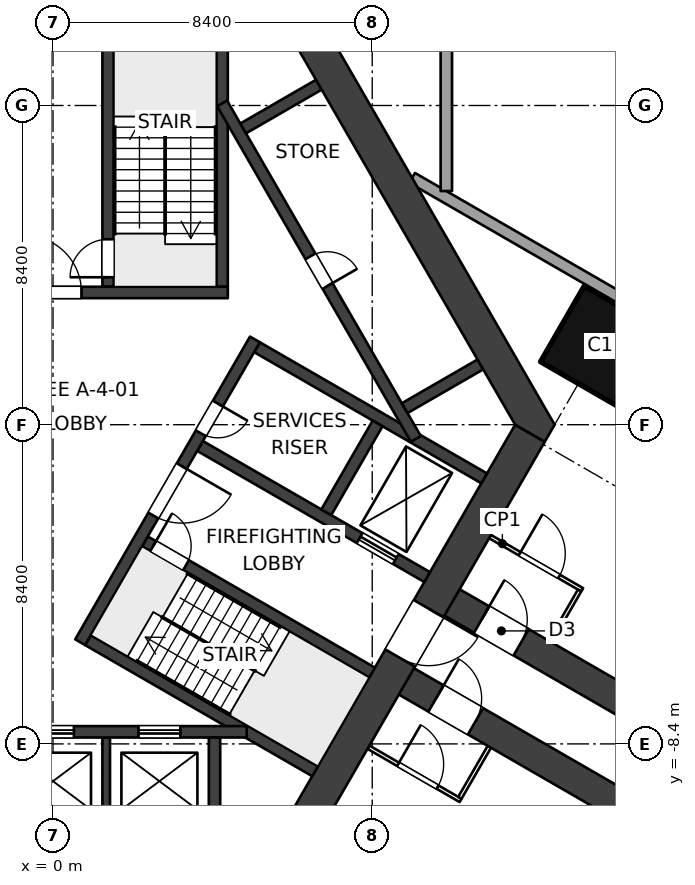
"""IFC4 building model, lengths in metres.
Left out: names, types, materials, properties, quantities, classifications, styles, units other than length and angle.
Written with IfcOpenShell. Run it as: python <this file> out.ifc"""

import sys

from ifc_helpers import new_model, si_unit, direction, frame, frame_2d, origin, origin_2d, place, context, subcontext, project, spatial, polyline, rectangle, outline, extrude, element, fill, save


model = new_model("IFC4")
c1 = context("Model", 3, precision=1e-05, world=origin(), true_north=direction((0.0, 1.0)))
c2 = subcontext(c1, "Body", "Model", "MODEL_VIEW")
j1 = project(units=[si_unit("LENGTHUNIT", "METRE"), si_unit("PLANEANGLEUNIT", "RADIAN")], contexts=[c1])
p1 = place(None, origin())
s1 = spatial("IfcSite", under=j1, at=p1, CompositionType="ELEMENT")
p2 = place(p1, origin())
s2 = spatial("IfcBuilding", under=s1, at=p2, CompositionType="ELEMENT")
p3 = place(p2, frame((0.0, 0.0, -7.0)))
s3 = spatial("IfcBuildingStorey", under=s2, at=p3, CompositionType="ELEMENT", Elevation=-7.0)
p4 = place(p3, frame((14.4, 2.078, 0.0), z_axis=(0.0, 0.0, 1.0), x_axis=(-0.5, -0.866025403784, 0.0)))
e1 = element("IfcColumn", 1, at=p4, inside=s3, PredefinedType="COLUMN", context=c2, shape_type="SweptSolid", body=[
    extrude(rectangle(XDim=2.3, YDim=2.3, at=origin_2d()), origin(), (0.0, 0.0, 1.0), 3.5),
])
p5 = place(p3, frame((12.551, -0.225, 0.0), z_axis=(0.0, 0.0, 1.0), x_axis=(-0.499997612506, -0.8660267822, 0.0)))
e2 = element("IfcWall", 2, at=p5, inside=s3, PredefinedType="SHEAR", context=c2, shape_type="SweptSolid", body=[
    extrude(rectangle(XDim=12.161, YDim=0.9, at=frame_2d((6.08, 0.0))), origin(), (0.0, 0.0, 1.0), 3.5),
])
p6 = place(p5, frame((5.33, 0.0, 0.0)))
e3 = element("IfcOpeningElement", 3, at=p6, cuts=e2, PredefinedType="OPENING", context=c2, shape_type="SweptSolid", body=[
    extrude(rectangle(XDim=1.5, YDim=2.1, at=frame_2d((0.75, 1.05))), frame((0.0, 0.46, 0.0), z_axis=(0.0, -1.0, 0.0), x_axis=(1.0, 0.0, 0.0)), (0.0, 0.0, 1.0), 0.92),
])
p7 = place(p3, origin())
e4 = element("IfcWall", 4, at=p7, inside=s3, PredefinedType="SHEAR", context=c2, shape_type="SweptSolid", body=[
    extrude(outline(polyline([(13.2, 0.0), (6.6, 11.432), (6.08, 11.432), (6.08, 10.531), (12.161, 0.0), (12.94, -0.45), (13.2, 0.0)])), origin(), (0.0, 0.0, 1.0), 3.5),
])
p8 = place(p3, frame((-4.6, 3.48, 0.0), z_axis=(0.0, 0.0, 1.0), x_axis=(1.0, 0.0, 0.0)))
e5 = element("IfcWall", 5, at=p8, inside=s3, PredefinedType="SHEAR", context=c2, shape_type="SweptSolid", body=[
    extrude(rectangle(XDim=9.2, YDim=0.3, at=frame_2d((4.6, 0.0))), origin(), (0.0, 0.0, 1.0), 3.5),
])
p9 = place(p8, frame((3.85, 0.0, 0.0)))
e6 = element("IfcOpeningElement", 6, at=p9, cuts=e5, PredefinedType="OPENING", context=c2, shape_type="SweptSolid", body=[
    extrude(rectangle(XDim=1.5, YDim=2.1, at=frame_2d((0.75, 1.05))), frame((0.0, 0.16, 0.0), z_axis=(0.0, -1.0, 0.0), x_axis=(1.0, 0.0, 0.0)), (0.0, 0.0, 1.0), 0.32),
])
p10 = place(p8, frame((1.95, 0.0, 0.0)))
e7 = element("IfcOpeningElement", 7, at=p10, cuts=e5, PredefinedType="OPENING", context=c2, shape_type="SweptSolid", body=[
    extrude(rectangle(XDim=0.9, YDim=2.1, at=frame_2d((0.45, 1.05))), frame((0.0, 0.16, 0.0), z_axis=(0.0, -1.0, 0.0), x_axis=(1.0, 0.0, 0.0)), (0.0, 0.0, 1.0), 0.32),
])
p11 = place(p3, frame((1.45, 3.63, 0.0), z_axis=(0.0, 0.0, 1.0), x_axis=(0.0, 1.0, 0.0)))
e8 = element("IfcWall", 8, at=p11, inside=s3, PredefinedType="SHEAR", context=c2, shape_type="SweptSolid", body=[
    extrude(rectangle(XDim=6.902, YDim=0.3, at=frame_2d((3.451, 0.0))), origin(), (0.0, 0.0, 1.0), 3.5),
])
p12 = place(p11, frame((0.25, 0.0, 0.0)))
e9 = element("IfcOpeningElement", 9, at=p12, cuts=e8, PredefinedType="OPENING", context=c2, shape_type="SweptSolid", body=[
    extrude(rectangle(XDim=1.0, YDim=2.1, at=frame_2d((0.5, 1.05))), frame((0.0, 0.16, 0.0), z_axis=(0.0, -1.0, 0.0), x_axis=(1.0, 0.0, 0.0)), (0.0, 0.0, 1.0), 0.32),
])
p13 = place(p3, frame((4.45, 3.63, 0.0), z_axis=(0.0, 0.0, 1.0), x_axis=(0.0, 1.0, 0.0)))
e10 = element("IfcWall", 10, at=p13, inside=s3, PredefinedType="SHEAR", context=c2, shape_type="SweptSolid", body=[
    extrude(rectangle(XDim=6.902, YDim=0.3, at=frame_2d((3.451, 0.0))), origin(), (0.0, 0.0, 1.0), 3.5),
])
p14 = place(p3, frame((5.314, 2.244, 0.0), z_axis=(0.0, 0.0, 1.0), x_axis=(-0.499995050369, -0.866028261437, 0.0)))
e11 = element("IfcWall", 11, at=p14, inside=s3, PredefinedType="SHEAR", context=c2, shape_type="SweptSolid", body=[
    extrude(rectangle(XDim=9.2, YDim=0.3, at=frame_2d((4.6, 0.0))), origin(), (0.0, 0.0, 1.0), 3.5),
])
p15 = place(p14, frame((3.85, 0.0, 0.0)))
e12 = element("IfcOpeningElement", 12, at=p15, cuts=e11, PredefinedType="OPENING", context=c2, shape_type="SweptSolid", body=[
    extrude(rectangle(XDim=1.5, YDim=2.1, at=frame_2d((0.75, 1.05))), frame((0.0, 0.16, 0.0), z_axis=(0.0, -1.0, 0.0), x_axis=(1.0, 0.0, 0.0)), (0.0, 0.0, 1.0), 0.32),
])
p16 = place(p14, frame((1.95, 0.0, 0.0)))
e13 = element("IfcOpeningElement", 13, at=p16, cuts=e11, PredefinedType="OPENING", context=c2, shape_type="SweptSolid", body=[
    extrude(rectangle(XDim=0.9, YDim=2.1, at=frame_2d((0.45, 1.05))), frame((0.0, 0.16, 0.0), z_axis=(0.0, -1.0, 0.0), x_axis=(1.0, 0.0, 0.0)), (0.0, 0.0, 1.0), 0.32),
])
p17 = place(p3, frame((2.419, -3.071, 0.0), z_axis=(0.0, 0.0, 1.0), x_axis=(0.86602711848, -0.499997030048, 0.0)))
e14 = element("IfcWall", 14, at=p17, inside=s3, PredefinedType="SHEAR", context=c2, shape_type="SweptSolid", body=[
    extrude(rectangle(XDim=6.901, YDim=0.3, at=frame_2d((3.451, 0.0))), origin(), (0.0, 0.0, 1.0), 3.5),
])
p18 = place(p17, frame((0.25, 0.0, 0.0)))
e15 = element("IfcOpeningElement", 15, at=p18, cuts=e14, PredefinedType="OPENING", context=c2, shape_type="SweptSolid", body=[
    extrude(rectangle(XDim=1.0, YDim=2.1, at=frame_2d((0.5, 1.05))), frame((0.0, 0.16, 0.0), z_axis=(0.0, -1.0, 0.0), x_axis=(1.0, 0.0, 0.0)), (0.0, 0.0, 1.0), 0.32),
])
p19 = place(p3, frame((0.919, -5.669, 0.0), z_axis=(0.0, 0.0, 1.0), x_axis=(0.866011800373, -0.500023561059, 0.0)))
e16 = element("IfcWall", 16, at=p19, inside=s3, PredefinedType="SHEAR", context=c2, shape_type="SweptSolid", body=[
    extrude(rectangle(XDim=6.902, YDim=0.3, at=frame_2d((3.451, 0.0))), origin(), (0.0, 0.0, 1.0), 3.5),
])
p20 = place(p3, frame((3.869, -0.559, 0.0), z_axis=(0.0, 0.0, 1.0), x_axis=(0.86602711848, -0.499997030048, 0.0)))
e17 = element("IfcWall", 17, at=p20, inside=s3, PredefinedType="SHEAR", context=c2, shape_type="SweptSolid", body=[
    extrude(rectangle(XDim=6.901, YDim=0.3, at=frame_2d((3.451, 0.0))), origin(), (0.0, 0.0, 1.0), 3.5),
])
p21 = place(p20, frame((4.85, 0.0, 0.0)))
e18 = element("IfcOpeningElement", 18, at=p21, cuts=e17, PredefinedType="OPENING", context=c2, shape_type="SweptSolid", body=[
    extrude(rectangle(XDim=1.1, YDim=2.1, at=frame_2d((0.55, 1.05))), frame((0.0, 0.16, 0.0), z_axis=(0.0, -1.0, 0.0), x_axis=(1.0, 0.0, 0.0)), (0.0, 0.0, 1.0), 0.32),
])
p22 = place(p3, frame((5.369, 2.039, 0.0), z_axis=(0.0, 0.0, 1.0), x_axis=(0.86602711848, -0.499997030048, 0.0)))
e19 = element("IfcWall", 19, at=p22, inside=s3, PredefinedType="SHEAR", context=c2, shape_type="SweptSolid", body=[
    extrude(rectangle(XDim=6.901, YDim=0.3, at=frame_2d((3.451, 0.0))), origin(), (0.0, 0.0, 1.0), 3.5),
])
p23 = place(p3, frame((8.541, 0.034, 0.0), z_axis=(0.0, 0.0, 1.0), x_axis=(-0.50000943426, -0.866019956843, 0.0)))
e20 = element("IfcWall", 20, at=p23, inside=s3, PredefinedType="SHEAR", context=c2, shape_type="SweptSolid", body=[
    extrude(rectangle(XDim=2.7, YDim=0.3, at=frame_2d((1.35, 0.0))), origin(), (0.0, 0.0, 1.0), 3.5),
])
p24 = place(p3, frame((5.098, -8.082, 0.0), z_axis=(0.0, 0.0, 1.0), x_axis=(-1.0, 0.0, 0.0)))
e21 = element("IfcWall", 21, at=p24, inside=s3, PredefinedType="SHEAR", context=c2, shape_type="SweptSolid", body=[
    extrude(rectangle(XDim=10.195, YDim=0.3, at=frame_2d((5.098, 0.0))), origin(), (0.0, 0.0, 1.0), 3.5),
])
p25 = place(p24, frame((1.748, 0.0, 0.0)))
e22 = element("IfcOpeningElement", 22, at=p25, cuts=e21, PredefinedType="OPENING", context=c2, shape_type="SweptSolid", body=[
    extrude(rectangle(XDim=1.1, YDim=2.1, at=frame_2d((0.55, 1.05))), frame((0.0, 0.16, 0.0), z_axis=(0.0, -1.0, 0.0), x_axis=(1.0, 0.0, 0.0)), (0.0, 0.0, 1.0), 0.32),
])
p26 = place(p24, frame((4.548, 0.0, 0.0)))
e23 = element("IfcOpeningElement", 23, at=p26, cuts=e21, PredefinedType="OPENING", context=c2, shape_type="SweptSolid", body=[
    extrude(rectangle(XDim=1.1, YDim=2.1, at=frame_2d((0.55, 1.05))), frame((0.0, 0.16, 0.0), z_axis=(0.0, -1.0, 0.0), x_axis=(1.0, 0.0, 0.0)), (0.0, 0.0, 1.0), 0.32),
])
p27 = place(p24, frame((7.348, 0.0, 0.0)))
e24 = element("IfcOpeningElement", 24, at=p27, cuts=e21, PredefinedType="OPENING", context=c2, shape_type="SweptSolid", body=[
    extrude(rectangle(XDim=1.1, YDim=2.1, at=frame_2d((0.55, 1.05))), frame((0.0, 0.16, 0.0), z_axis=(0.0, -1.0, 0.0), x_axis=(1.0, 0.0, 0.0)), (0.0, 0.0, 1.0), 0.32),
])
p28 = place(p3, frame((4.25, -8.231, 0.0), z_axis=(0.0, 0.0, 1.0), x_axis=(0.0, -1.0, 0.0)))
e25 = element("IfcWall", 25, at=p28, inside=s3, PredefinedType="SHEAR", context=c2, shape_type="SweptSolid", body=[
    extrude(rectangle(XDim=2.3, YDim=0.3, at=frame_2d((1.15, 0.0))), origin(), (0.0, 0.0, 1.0), 3.5),
])
p29 = place(p3, frame((1.4, -8.231, 0.0), z_axis=(0.0, 0.0, 1.0), x_axis=(0.0, -1.0, 0.0)))
e26 = element("IfcWall", 26, at=p29, inside=s3, PredefinedType="SHEAR", context=c2, shape_type="SweptSolid", body=[
    extrude(rectangle(XDim=2.3, YDim=0.2, at=frame_2d((1.15, 0.0))), origin(), (0.0, 0.0, 1.0), 3.5),
])
p30 = place(p3, frame((4.45, 8.455, 0.0), z_axis=(0.0, 0.0, 1.0), x_axis=(0.500002290144, -0.866024081565, 0.0)))
e27 = element("IfcWall", 27, at=p30, inside=s3, PredefinedType="SHEAR", context=c2, shape_type="SweptSolid", body=[
    extrude(rectangle(XDim=10.195, YDim=0.3, at=frame_2d((5.098, 0.0))), origin(), (0.0, 0.0, 1.0), 3.5),
])
p31 = place(p30, frame((4.648, 0.0, 0.0)))
e28 = element("IfcOpeningElement", 28, at=p31, cuts=e27, PredefinedType="OPENING", context=c2, shape_type="SweptSolid", body=[
    extrude(rectangle(XDim=0.9, YDim=2.1, at=frame_2d((0.45, 1.05))), frame((0.0, 0.16, 0.0), z_axis=(0.0, -1.0, 0.0), x_axis=(1.0, 0.0, 0.0)), (0.0, 0.0, 1.0), 0.32),
])
for number, where, z_axis, x_axis in (
    (29, (5.004, 7.796, 0.0), (0.0, 0.0, 1.0), (0.866, 0.5, 0.0)),
    (30, (9.254, 0.435, 0.0), (0.0, 0.0, 1.0), (0.866, 0.5, 0.0)),
):
    element("IfcWall", number, at=place(p3, frame(where, z_axis=z_axis, x_axis=x_axis)), inside=s3, PredefinedType="SHEAR", context=c2, shape_type="SweptSolid", body=[
        extrude(rectangle(XDim=2.3, YDim=0.3, at=frame_2d((1.15, 0.0))), origin(), (0.0, 0.0, 1.0), 3.5),
    ])
p32 = place(p3, frame((10.11, -4.451, 0.0), z_axis=(0.0, 0.0, 1.0), x_axis=(0.866025284237, -0.500000207062, 0.0)))
e31 = element("IfcWall", 31, at=p32, inside=s3, PredefinedType="SHEAR", context=c2, shape_type="SweptSolid", body=[
    extrude(rectangle(XDim=36.75, YDim=0.8, at=frame_2d((18.375, 0.0))), origin(), (0.0, 0.0, 1.0), 3.5),
])
p33 = place(p32, frame((1.35, 0.0, 0.0)))
e32 = element("IfcOpeningElement", 32, at=p33, cuts=e31, PredefinedType="OPENING", context=c2, shape_type="SweptSolid", body=[
    extrude(rectangle(XDim=1.2, YDim=2.1, at=frame_2d((0.6, 1.05))), frame((0.0, 0.41, 0.0), z_axis=(0.0, -1.0, 0.0), x_axis=(1.0, 0.0, 0.0)), (0.0, 0.0, 1.0), 0.82),
])
p34 = place(p3, frame((8.91, -6.53, 0.0), z_axis=(0.0, 0.0, 1.0), x_axis=(0.866025284237, -0.500000207062, 0.0)))
e33 = element("IfcWall", 33, at=p34, inside=s3, PredefinedType="SHEAR", context=c2, shape_type="SweptSolid", body=[
    extrude(rectangle(XDim=36.75, YDim=0.8, at=frame_2d((18.375, 0.0))), origin(), (0.0, 0.0, 1.0), 3.5),
])
p35 = place(p34, frame((1.35, 0.0, 0.0)))
e34 = element("IfcOpeningElement", 34, at=p35, cuts=e33, PredefinedType="OPENING", context=c2, shape_type="SweptSolid", body=[
    extrude(rectangle(XDim=1.2, YDim=2.1, at=frame_2d((0.6, 1.05))), frame((0.0, 0.41, 0.0), z_axis=(0.0, -1.0, 0.0), x_axis=(1.0, 0.0, 0.0)), (0.0, 0.0, 1.0), 0.82),
])
p36 = place(p3, frame((11.5, -2.945, 0.0), z_axis=(0.0, 0.0, 1.0), x_axis=(0.866034573852, -0.49998411664, 0.0)))
e35 = element("IfcWall", 35, at=p36, inside=s3, PredefinedType="PARTITIONING", context=c2, shape_type="SweptSolid", body=[
    extrude(rectangle(XDim=2.8, YDim=0.1, at=frame_2d((1.4, 0.0))), origin(), (0.0, 0.0, 1.0), 3.2),
])
p37 = place(p36, frame((0.9, 0.0, 0.0)))
e36 = element("IfcOpeningElement", 36, at=p37, cuts=e35, PredefinedType="OPENING", context=c2, shape_type="SweptSolid", body=[
    extrude(rectangle(XDim=1.2, YDim=2.1, at=frame_2d((0.6, 1.05))), frame((0.0, 0.06, 0.0), z_axis=(0.0, -1.0, 0.0), x_axis=(1.0, 0.0, 0.0)), (0.0, 0.0, 1.0), 0.12),
])
p38 = place(p3, frame((13.082, -5.705, 0.0), z_axis=(0.0, 0.0, 1.0), x_axis=(0.500086022567, 0.865975732936, 0.0)))
e37 = element("IfcWall", 37, at=p38, inside=s3, PredefinedType="PARTITIONING", context=c2, shape_type="SweptSolid", body=[
    extrude(rectangle(XDim=1.55, YDim=0.1, at=frame_2d((0.775, 0.0))), origin(), (0.0, 0.0, 1.0), 3.2),
])
p39 = place(p3, frame((8.3, -8.487, 0.0), z_axis=(0.0, 0.0, 1.0), x_axis=(0.866034573852, -0.49998411664, 0.0)))
e38 = element("IfcWall", 38, at=p39, inside=s3, PredefinedType="PARTITIONING", context=c2, shape_type="SweptSolid", body=[
    extrude(rectangle(XDim=2.8, YDim=0.1, at=frame_2d((1.4, 0.0))), origin(), (0.0, 0.0, 1.0), 3.2),
])
p40 = place(p39, frame((0.9, 0.0, 0.0)))
e39 = element("IfcOpeningElement", 39, at=p40, cuts=e38, PredefinedType="OPENING", context=c2, shape_type="SweptSolid", body=[
    extrude(rectangle(XDim=1.2, YDim=2.1, at=frame_2d((0.6, 1.05))), frame((0.0, 0.06, 0.0), z_axis=(0.0, -1.0, 0.0), x_axis=(1.0, 0.0, 0.0)), (0.0, 0.0, 1.0), 0.12),
])
p41 = place(p3, frame((11.482, -8.476, 0.0), z_axis=(0.0, 0.0, 1.0), x_axis=(-0.500017819788, -0.86601511528, 0.0)))
e40 = element("IfcWall", 40, at=p41, inside=s3, PredefinedType="PARTITIONING", context=c2, shape_type="SweptSolid", body=[
    extrude(rectangle(XDim=1.55, YDim=0.1, at=frame_2d((0.775, 0.0))), origin(), (0.0, 0.0, 1.0), 3.2),
])
p42 = place(p3, frame((10.35, 6.149, 0.0), z_axis=(0.0, 0.0, 1.0), x_axis=(0.0, 1.0, 0.0)))
e41 = element("IfcWall", 41, at=p42, inside=s3, PredefinedType="SOLIDWALL", context=c2, shape_type="SweptSolid", body=[
    extrude(rectangle(XDim=41.883, YDim=0.3, at=frame_2d((20.941, 0.0))), origin(), (0.0, 0.0, 1.0), 3.2),
])
p43 = place(p42, frame((25.383, 0.0, 0.0)))
e42 = element("IfcOpeningElement", 42, at=p43, cuts=e41, PredefinedType="OPENING", context=c2, shape_type="SweptSolid", body=[
    extrude(rectangle(XDim=1.8, YDim=2.4, at=frame_2d((0.9, 1.2))), frame((0.0, 0.16, 0.0), z_axis=(0.0, -1.0, 0.0), x_axis=(1.0, 0.0, 0.0)), (0.0, 0.0, 1.0), 0.32),
])
p44 = place(p3, frame((9.45, 6.495, 0.0), z_axis=(0.0, 0.0, 1.0), x_axis=(0.866025301493, -0.500000177174, 0.0)))
e43 = element("IfcWall", 43, at=p44, inside=s3, PredefinedType="SOLIDWALL", context=c2, shape_type="SweptSolid", body=[
    extrude(rectangle(XDim=43.095, YDim=0.3, at=frame_2d((21.548, 0.0))), origin(), (0.0, 0.0, 1.0), 3.2),
])
p45 = place(p44, frame((26.595, 0.0, 0.0)))
e44 = element("IfcOpeningElement", 44, at=p45, cuts=e43, PredefinedType="OPENING", context=c2, shape_type="SweptSolid", body=[
    extrude(rectangle(XDim=1.8, YDim=2.4, at=frame_2d((0.9, 1.2))), frame((0.0, 0.16, 0.0), z_axis=(0.0, -1.0, 0.0), x_axis=(1.0, 0.0, 0.0)), (0.0, 0.0, 1.0), 0.32),
])
p46 = place(p25, origin())
e45 = element("IfcDoor", 45, at=p46, inside=s3, OperationType="DOUBLE_DOOR_SLIDING", PredefinedType="DOOR", context=c2, shape_type="SweptSolid", body=[
    extrude(rectangle(XDim=1.1, YDim=2.1, at=frame_2d((0.55, 1.05))), frame((0.0, 0.025, 0.0), z_axis=(0.0, -1.0, 0.0), x_axis=(1.0, 0.0, 0.0)), (0.0, 0.0, 1.0), 0.05),
])
fill(e22, e45)
p47 = place(p26, origin())
e46 = element("IfcDoor", 46, at=p47, inside=s3, OperationType="DOUBLE_DOOR_SLIDING", PredefinedType="DOOR", context=c2, shape_type="SweptSolid", body=[
    extrude(rectangle(XDim=1.1, YDim=2.1, at=frame_2d((0.55, 1.05))), frame((0.0, 0.025, 0.0), z_axis=(0.0, -1.0, 0.0), x_axis=(1.0, 0.0, 0.0)), (0.0, 0.0, 1.0), 0.05),
])
fill(e23, e46)
p48 = place(p21, origin())
e47 = element("IfcDoor", 47, at=p48, inside=s3, OperationType="DOUBLE_DOOR_SLIDING", PredefinedType="DOOR", context=c2, shape_type="SweptSolid", body=[
    extrude(rectangle(XDim=1.1, YDim=2.1, at=frame_2d((0.55, 1.05))), frame((0.0, 0.025, 0.0), z_axis=(0.0, -1.0, 0.0), x_axis=(1.0, 0.0, 0.0)), (0.0, 0.0, 1.0), 0.05),
])
fill(e18, e47)
p49 = place(p9, origin())
e48 = element("IfcDoor", 48, at=p49, inside=s3, OperationType="DOUBLE_DOOR_DOUBLE_SWING", PredefinedType="DOOR", context=c2, shape_type="SweptSolid", body=[
    extrude(rectangle(XDim=1.5, YDim=2.1, at=frame_2d((0.75, 1.05))), frame((0.0, 0.025, 0.0), z_axis=(0.0, -1.0, 0.0), x_axis=(1.0, 0.0, 0.0)), (0.0, 0.0, 1.0), 0.05),
])
fill(e6, e48)
p50 = place(p12, origin())
e49 = element("IfcDoor", 49, at=p50, inside=s3, OperationType="SINGLE_SWING_LEFT", PredefinedType="DOOR", context=c2, shape_type="SweptSolid", body=[
    extrude(rectangle(XDim=1.0, YDim=2.1, at=frame_2d((0.5, 1.05))), frame((0.0, 0.025, 0.0), z_axis=(0.0, -1.0, 0.0), x_axis=(1.0, 0.0, 0.0)), (0.0, 0.0, 1.0), 0.05),
])
fill(e9, e49)
p51 = place(p15, origin())
e50 = element("IfcDoor", 50, at=p51, inside=s3, OperationType="DOUBLE_DOOR_DOUBLE_SWING", PredefinedType="DOOR", context=c2, shape_type="SweptSolid", body=[
    extrude(rectangle(XDim=1.5, YDim=2.1, at=frame_2d((0.75, 1.05))), frame((0.0, 0.025, 0.0), z_axis=(0.0, -1.0, 0.0), x_axis=(1.0, 0.0, 0.0)), (0.0, 0.0, 1.0), 0.05),
])
fill(e12, e50)
p52 = place(p16, origin())
e51 = element("IfcDoor", 51, at=p52, inside=s3, OperationType="SINGLE_SWING_LEFT", PredefinedType="DOOR", context=c2, shape_type="SweptSolid", body=[
    extrude(rectangle(XDim=0.9, YDim=2.1, at=frame_2d((0.45, 1.05))), frame((0.0, 0.025, 0.0), z_axis=(0.0, -1.0, 0.0), x_axis=(1.0, 0.0, 0.0)), (0.0, 0.0, 1.0), 0.05),
])
fill(e13, e51)
p53 = place(p18, origin())
e52 = element("IfcDoor", 52, at=p53, inside=s3, OperationType="SINGLE_SWING_LEFT", PredefinedType="DOOR", context=c2, shape_type="SweptSolid", body=[
    extrude(rectangle(XDim=1.0, YDim=2.1, at=frame_2d((0.5, 1.05))), frame((0.0, 0.025, 0.0), z_axis=(0.0, -1.0, 0.0), x_axis=(1.0, 0.0, 0.0)), (0.0, 0.0, 1.0), 0.05),
])
fill(e15, e52)
p54 = place(p6, origin())
e53 = element("IfcDoor", 53, at=p54, inside=s3, OperationType="DOUBLE_DOOR_DOUBLE_SWING", PredefinedType="DOOR", context=c2, shape_type="SweptSolid", body=[
    extrude(rectangle(XDim=1.5, YDim=2.1, at=frame_2d((0.75, 1.05))), frame((0.0, 0.025, 0.0), z_axis=(0.0, -1.0, 0.0), x_axis=(1.0, 0.0, 0.0)), (0.0, 0.0, 1.0), 0.05),
])
fill(e3, e53)
p55 = place(p31, origin())
e54 = element("IfcDoor", 54, at=p55, inside=s3, OperationType="SINGLE_SWING_RIGHT", PredefinedType="DOOR", context=c2, shape_type="SweptSolid", body=[
    extrude(rectangle(XDim=0.9, YDim=2.1, at=frame_2d((0.45, 1.05))), frame((0.0, 0.025, 0.0), z_axis=(0.0, -1.0, 0.0), x_axis=(1.0, 0.0, 0.0)), (0.0, 0.0, 1.0), 0.05),
])
fill(e28, e54)
p56 = place(p33, origin())
e55 = element("IfcDoor", 55, at=p56, inside=s3, OperationType="DOUBLE_SWING_LEFT", PredefinedType="DOOR", context=c2, shape_type="SweptSolid", body=[
    extrude(rectangle(XDim=1.2, YDim=2.1, at=frame_2d((0.6, 1.05))), frame((0.0, 0.025, 0.0), z_axis=(0.0, -1.0, 0.0), x_axis=(1.0, 0.0, 0.0)), (0.0, 0.0, 1.0), 0.05),
])
fill(e32, e55)
p57 = place(p37, origin())
e56 = element("IfcDoor", 56, at=p57, inside=s3, OperationType="DOUBLE_SWING_LEFT", PredefinedType="DOOR", context=c2, shape_type="SweptSolid", body=[
    extrude(rectangle(XDim=1.2, YDim=2.1, at=frame_2d((0.6, 1.05))), frame((0.0, 0.025, 0.0), z_axis=(0.0, -1.0, 0.0), x_axis=(1.0, 0.0, 0.0)), (0.0, 0.0, 1.0), 0.05),
])
fill(e36, e56)
p58 = place(p35, origin())
e57 = element("IfcDoor", 57, at=p58, inside=s3, OperationType="DOUBLE_SWING_LEFT", PredefinedType="DOOR", context=c2, shape_type="SweptSolid", body=[
    extrude(rectangle(XDim=1.2, YDim=2.1, at=frame_2d((0.6, 1.05))), frame((0.0, 0.025, 0.0), z_axis=(0.0, -1.0, 0.0), x_axis=(1.0, 0.0, 0.0)), (0.0, 0.0, 1.0), 0.05),
])
fill(e34, e57)
p59 = place(p40, origin())
e58 = element("IfcDoor", 58, at=p59, inside=s3, OperationType="DOUBLE_SWING_LEFT", PredefinedType="DOOR", context=c2, shape_type="SweptSolid", body=[
    extrude(rectangle(XDim=1.2, YDim=2.1, at=frame_2d((0.6, 1.05))), frame((0.0, 0.025, 0.0), z_axis=(0.0, -1.0, 0.0), x_axis=(1.0, 0.0, 0.0)), (0.0, 0.0, 1.0), 0.05),
])
fill(e39, e58)
save(model, sys.argv[1])
